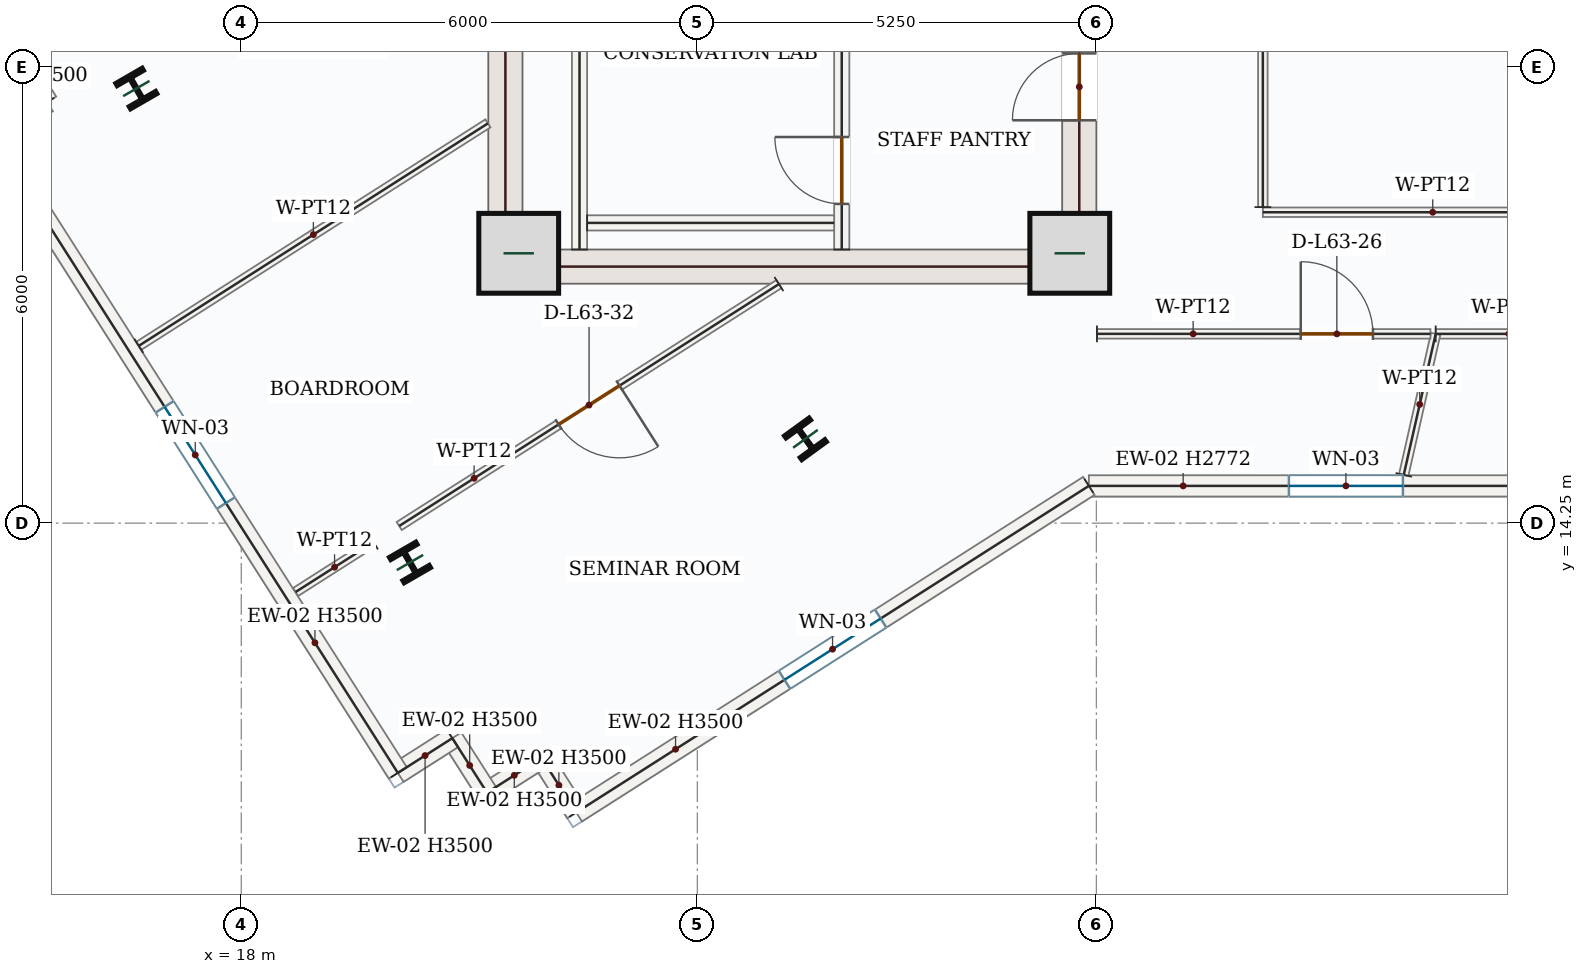
"""IFC4 building model, lengths in metres.
Left out: names, types, materials, properties, quantities, classifications, styles, units other than length and angle.
Written with IfcOpenShell. Run it as: python <this file> out.ifc"""

import sys

from ifc_helpers import new_model, si_unit, direction, frame, frame_2d, origin, origin_2d, place, context, subcontext, project, spatial, rectangle, i_section, extrude, source, transform, mapped, element, fill, save


model = new_model("IFC4")
c1 = context("Model", 3, precision=1e-05, world=origin(), true_north=direction((0.0, 1.0)))
c2 = subcontext(c1, "Body", "Model", "MODEL_VIEW")
j1 = project(units=[si_unit("LENGTHUNIT", "METRE"), si_unit("PLANEANGLEUNIT", "RADIAN")], contexts=[c1])
p1 = place(None, origin())
s1 = spatial("IfcSite", under=j1, at=p1, CompositionType="ELEMENT")
p2 = place(p1, origin())
s2 = spatial("IfcBuilding", under=s1, at=p2, CompositionType="ELEMENT")
p3 = place(p2, frame((0.0, 0.0, 265.35)))
s3 = spatial("IfcBuildingStorey", under=s2, at=p3, CompositionType="ELEMENT", Elevation=265.35)
m1 = source(origin(), c2, "Body", "SweptSolid", [
    extrude(rectangle(XDim=8.55, YDim=0.45, at=frame_2d((4.275, 0.0))), origin(), (0.0, 0.0, 1.0), 3.5),
])
p4 = place(p3, frame((21.475, 17.4, 0.0), z_axis=(0.0, 0.0, 1.0), x_axis=(0.0, 1.0, 0.0)))
e1 = element("IfcWall", 1, at=p4, inside=s3, PredefinedType="SHEAR", context=c2, shape_type="MappedRepresentation", body=[
    mapped(m1, transform((0.0, 0.0, 0.0), x_axis=(1.0, 0.0, 0.0), y_axis=(0.0, 1.0, 0.0), z_axis=(0.0, 0.0, 1.0), scale=1.0)),
])
p5 = place(p3, frame((29.025, 17.4, 0.0), z_axis=(0.0, 0.0, 1.0), x_axis=(0.0, 1.0, 0.0)))
e2 = element("IfcWall", 2, at=p5, inside=s3, PredefinedType="SHEAR", context=c2, shape_type="SweptSolid", body=[
    extrude(rectangle(XDim=8.55, YDim=0.45, at=frame_2d((4.275, 0.0))), origin(), (0.0, 0.0, 1.0), 3.5),
])
p6 = place(p5, frame((6.65, 0.0, 0.0)))
e3 = element("IfcOpeningElement", 3, at=p6, cuts=e2, PredefinedType="OPENING", context=c2, shape_type="SweptSolid", body=[
    extrude(rectangle(XDim=1.1, YDim=2.2, at=frame_2d((0.55, 1.1))), frame((0.0, 0.235, 0.0), z_axis=(0.0, -1.0, 0.0), x_axis=(1.0, 0.0, 0.0)), (0.0, 0.0, 1.0), 0.47),
])
p7 = place(p5, frame((2.15, 0.0, 0.0)))
e4 = element("IfcOpeningElement", 4, at=p7, cuts=e2, PredefinedType="OPENING", context=c2, shape_type="SweptSolid", body=[
    extrude(rectangle(XDim=0.88, YDim=2.1, at=frame_2d((0.44, 1.05))), frame((0.0, 0.235, 0.0), z_axis=(0.0, -1.0, 0.0), x_axis=(1.0, 0.0, 0.0)), (0.0, 0.0, 1.0), 0.47),
])
p8 = place(p5, frame((4.25, 0.0, 0.0)))
e5 = element("IfcOpeningElement", 5, at=p8, cuts=e2, PredefinedType="OPENING", context=c2, shape_type="SweptSolid", body=[
    extrude(rectangle(XDim=0.88, YDim=2.1, at=frame_2d((0.44, 1.05))), frame((0.0, 0.235, 0.0), z_axis=(0.0, -1.0, 0.0), x_axis=(1.0, 0.0, 0.0)), (0.0, 0.0, 1.0), 0.47),
])
m2 = source(origin(), c2, "Body", "SweptSolid", [
    extrude(rectangle(XDim=7.1, YDim=0.45, at=frame_2d((3.55, 0.0))), origin(), (0.0, 0.0, 1.0), 3.5),
])
p9 = place(p3, frame((21.7, 17.625, 0.0), z_axis=(0.0, 0.0, 1.0), x_axis=(1.0, 0.0, 0.0)))
e6 = element("IfcWall", 6, at=p9, inside=s3, PredefinedType="SHEAR", context=c2, shape_type="MappedRepresentation", body=[
    mapped(m2, transform((0.0, 0.0, 0.0), x_axis=(1.0, 0.0, 0.0), y_axis=(0.0, 1.0, 0.0), z_axis=(0.0, 0.0, 1.0), scale=1.0)),
])
m3 = source(origin(), c2, "Body", "SweptSolid", [
    extrude(rectangle(XDim=1.05, YDim=1.05, at=origin_2d()), origin(), (0.0, 0.0, 1.0), 3.75),
])
for number, where, z_axis, x_axis in (
    (7, (21.65, 17.8, 0.0), (0.0, 0.0, 1.0), (1.0, 0.0, 0.0)),
    (8, (28.9, 17.8, 0.0), (0.0, 0.0, 1.0), (1.0, 0.0, 0.0)),
):
    element("IfcColumn", number, at=place(p3, frame(where, z_axis=z_axis, x_axis=x_axis)), inside=s3, PredefinedType="COLUMN", context=c2, shape_type="MappedRepresentation", body=[
        mapped(m3, transform((0.0, 0.0, 0.0), x_axis=(1.0, 0.0, 0.0), y_axis=(0.0, 1.0, 0.0), z_axis=(0.0, 0.0, 1.0), scale=1.0)),
    ])
m4 = source(origin(), c2, "Body", "SweptSolid", [
    extrude(i_section(OverallWidth=0.399, OverallDepth=0.386, WebThickness=0.021, FlangeThickness=0.033, FilletRadius=0.018, at=origin_2d()), origin(), (0.0, 0.0, 1.0), 3.75),
])
for number, where, z_axis, x_axis in (
    (9, (25.422, 15.359, 0.0), (0.0, 0.0, 1.0), (0.809, 0.588, 0.0)),
    (10, (16.62, 19.968, 0.0), (0.0, 0.0, 1.0), (0.866, 0.5, 0.0)),
    (11, (20.22, 13.732, 0.0), (0.0, 0.0, 1.0), (0.866, 0.5, 0.0)),
):
    element("IfcColumn", number, at=place(p3, frame(where, z_axis=z_axis, x_axis=x_axis)), inside=s3, PredefinedType="COLUMN", context=c2, shape_type="MappedRepresentation", body=[
        mapped(m4, transform((0.0, 0.0, 0.0), x_axis=(1.0, 0.0, 0.0), y_axis=(0.0, 1.0, 0.0), z_axis=(0.0, 0.0, 1.0), scale=1.0)),
    ])
p10 = place(p3, frame((35.914, 14.74, 0.0), z_axis=(0.0, 0.0, 1.0), x_axis=(-1.0, 0.0, 0.0)))
e12 = element("IfcWall", 12, at=p10, inside=s3, PredefinedType="SOLIDWALL", context=c2, shape_type="SweptSolid", body=[
    extrude(rectangle(XDim=6.763, YDim=0.28, at=frame_2d((3.381, 0.0))), origin(), (0.0, 0.0, 1.0), 2.772),
])
p11 = place(p10, frame((2.631, 0.0, 0.85)))
e13 = element("IfcOpeningElement", 13, at=p11, cuts=e12, PredefinedType="OPENING", context=c2, shape_type="SweptSolid", body=[
    extrude(rectangle(XDim=1.5, YDim=1.5, at=frame_2d((0.75, 0.75))), frame((0.0, 0.15, 0.0), z_axis=(0.0, -1.0, 0.0), x_axis=(1.0, 0.0, 0.0)), (0.0, 0.0, 1.0), 0.3),
])
p12 = place(p3, frame((29.151, 14.74, 0.0), z_axis=(0.0, 0.0, 1.0), x_axis=(-0.843388565396, -0.537304129669, 0.0)))
e14 = element("IfcWall", 14, at=p12, inside=s3, PredefinedType="SOLIDWALL", context=c2, shape_type="SweptSolid", body=[
    extrude(rectangle(XDim=7.996, YDim=0.28, at=frame_2d((3.998, 0.0))), origin(), (0.0, 0.0, 1.0), 3.5),
])
p13 = place(p12, frame((3.248, 0.0, 0.85)))
e15 = element("IfcOpeningElement", 15, at=p13, cuts=e14, PredefinedType="OPENING", context=c2, shape_type="SweptSolid", body=[
    extrude(rectangle(XDim=1.5, YDim=1.5, at=frame_2d((0.75, 0.75))), frame((0.0, 0.15, 0.0), z_axis=(0.0, -1.0, 0.0), x_axis=(1.0, 0.0, 0.0)), (0.0, 0.0, 1.0), 0.3),
])
m5 = source(origin(), c2, "Body", "SweptSolid", [
    extrude(rectangle(XDim=0.85, YDim=0.28, at=frame_2d((0.425, 0.0))), origin(), (0.0, 0.0, 1.0), 3.5),
])
for number, where, z_axis, x_axis in (
    (16, (22.407, 10.444, 0.0), (0.0, 0.0, 1.0), (-0.537, 0.843, 0.0)),
    (17, (21.95, 11.16, 0.0), (0.0, 0.0, 1.0), (-0.843, -0.537, 0.0)),
    (18, (21.233, 10.704, 0.0), (0.0, 0.0, 1.0), (-0.537, 0.843, 0.0)),
    (19, (20.777, 11.421, 0.0), (0.0, 0.0, 1.0), (-0.843, -0.537, 0.0)),
):
    element("IfcWall", number, at=place(p3, frame(where, z_axis=z_axis, x_axis=x_axis)), inside=s3, PredefinedType="SOLIDWALL", context=c2, shape_type="MappedRepresentation", body=[
        mapped(m5, transform((0.0, 0.0, 0.0), x_axis=(1.0, 0.0, 0.0), y_axis=(0.0, 1.0, 0.0), z_axis=(0.0, 0.0, 1.0), scale=1.0)),
    ])
p14 = place(p3, frame((20.06, 10.964, 0.0), z_axis=(0.0, 0.0, 1.0), x_axis=(-0.537314949054, 0.843381672508, 0.0)))
e20 = element("IfcWall", 20, at=p14, inside=s3, PredefinedType="SOLIDWALL", context=c2, shape_type="SweptSolid", body=[
    extrude(rectangle(XDim=9.92, YDim=0.28, at=frame_2d((4.96, 0.0))), origin(), (0.0, 0.0, 1.0), 3.5),
])
p15 = place(p14, frame((4.21, 0.0, 0.85)))
e21 = element("IfcOpeningElement", 21, at=p15, cuts=e20, PredefinedType="OPENING", context=c2, shape_type="SweptSolid", body=[
    extrude(rectangle(XDim=1.5, YDim=1.5, at=frame_2d((0.75, 0.75))), frame((0.0, 0.15, 0.0), z_axis=(0.0, -1.0, 0.0), x_axis=(1.0, 0.0, 0.0)), (0.0, 0.0, 1.0), 0.3),
])
m6 = source(origin(), c2, "Body", "SweptSolid", [
    extrude(rectangle(XDim=0.85, YDim=0.28, at=frame_2d((0.425, 0.0))), origin(), (0.0, 0.0, 1.0), 3.5),
])
p16 = place(p3, frame((14.73, 19.33, 0.0), z_axis=(0.0, 0.0, 1.0), x_axis=(0.843401251716, 0.537284215853, 0.0)))
e22 = element("IfcWall", 22, at=p16, inside=s3, PredefinedType="SOLIDWALL", context=c2, shape_type="MappedRepresentation", body=[
    mapped(m6, transform((0.0, 0.0, 0.0), x_axis=(1.0, 0.0, 0.0), y_axis=(0.0, 1.0, 0.0), z_axis=(0.0, 0.0, 1.0), scale=1.0)),
])
for number, where, z_axis, x_axis in (
    (23, (15.447, 19.787, 0.0), (0.0, 0.0, 1.0), (-0.537, 0.843, 0.0)),
    (24, (14.99, 20.504, 0.0), (0.0, 0.0, 1.0), (0.843, 0.537, 0.0)),
):
    element("IfcWall", number, at=place(p3, frame(where, z_axis=z_axis, x_axis=x_axis)), inside=s3, PredefinedType="SOLIDWALL", context=c2, shape_type="MappedRepresentation", body=[
        mapped(m5, transform((0.0, 0.0, 0.0), x_axis=(1.0, 0.0, 0.0), y_axis=(0.0, 1.0, 0.0), z_axis=(0.0, 0.0, 1.0), scale=1.0)),
    ])
m7 = source(origin(), c2, "Body", "SweptSolid", [
    extrude(rectangle(XDim=7.87, YDim=0.2, at=frame_2d((3.935, 0.0))), origin(), (0.0, 0.0, 1.0), 3.5),
])
p17 = place(p3, frame((22.45, 17.85, 0.0), z_axis=(0.0, 0.0, 1.0), x_axis=(0.0, 1.0, 0.0)))
e25 = element("IfcWall", 25, at=p17, inside=s3, PredefinedType="SOLIDWALL", context=c2, shape_type="MappedRepresentation", body=[
    mapped(m7, transform((0.0, 0.0, 0.0), x_axis=(1.0, 0.0, 0.0), y_axis=(0.0, 1.0, 0.0), z_axis=(0.0, 0.0, 1.0), scale=1.0)),
])
p18 = place(p3, frame((25.9, 17.85, 0.0), z_axis=(0.0, 0.0, 1.0), x_axis=(0.0, 1.0, 0.0)))
e26 = element("IfcWall", 26, at=p18, inside=s3, PredefinedType="SOLIDWALL", context=c2, shape_type="SweptSolid", body=[
    extrude(rectangle(XDim=8.0, YDim=0.2, at=frame_2d((4.0, 0.0))), origin(), (0.0, 0.0, 1.0), 3.5),
])
p19 = place(p18, frame((6.2, 0.0, 0.0)))
e27 = element("IfcOpeningElement", 27, at=p19, cuts=e26, PredefinedType="OPENING", context=c2, shape_type="SweptSolid", body=[
    extrude(rectangle(XDim=1.0, YDim=2.15, at=frame_2d((0.5, 1.075))), frame((0.0, 0.11, 0.0), z_axis=(0.0, -1.0, 0.0), x_axis=(1.0, 0.0, 0.0)), (0.0, 0.0, 1.0), 0.22),
])
p20 = place(p18, frame((0.6, 0.0, 0.0)))
e28 = element("IfcOpeningElement", 28, at=p20, cuts=e26, PredefinedType="OPENING", context=c2, shape_type="SweptSolid", body=[
    extrude(rectangle(XDim=0.88, YDim=2.1, at=frame_2d((0.44, 1.05))), frame((0.0, 0.11, 0.0), z_axis=(0.0, -1.0, 0.0), x_axis=(1.0, 0.0, 0.0)), (0.0, 0.0, 1.0), 0.22),
])
m8 = source(origin(), c2, "Body", "SweptSolid", [
    extrude(rectangle(XDim=3.25, YDim=0.2, at=frame_2d((1.625, 0.0))), origin(), (0.0, 0.0, 1.0), 3.5),
])
p21 = place(p3, frame((22.55, 18.2, 0.0), z_axis=(0.0, 0.0, 1.0), x_axis=(1.0, 0.0, 0.0)))
e29 = element("IfcWall", 29, at=p21, inside=s3, PredefinedType="SOLIDWALL", context=c2, shape_type="MappedRepresentation", body=[
    mapped(m8, transform((0.0, 0.0, 0.0), x_axis=(1.0, 0.0, 0.0), y_axis=(0.0, 1.0, 0.0), z_axis=(0.0, 0.0, 1.0), scale=1.0)),
])
p22 = place(p3, frame((25.073, 17.395, 0.0), z_axis=(0.0, 0.0, 1.0), x_axis=(-0.843398332862, -0.537288797693, 0.0)))
e30 = element("IfcWall", 30, at=p22, inside=s3, PredefinedType="PARTITIONING", context=c2, shape_type="SweptSolid", body=[
    extrude(rectangle(XDim=5.924, YDim=0.125, at=frame_2d((2.962, 0.0))), origin(), (0.0, 0.0, 1.0), 3.5),
])
p23 = place(p22, frame((2.487, 0.0, 0.0)))
e31 = element("IfcOpeningElement", 31, at=p23, cuts=e30, PredefinedType="OPENING", context=c2, shape_type="SweptSolid", body=[
    extrude(rectangle(XDim=0.95, YDim=2.15, at=frame_2d((0.475, 1.075))), frame((0.0, 0.073, 0.0), z_axis=(0.0, -1.0, 0.0), x_axis=(1.0, 0.0, 0.0)), (0.0, 0.0, 1.0), 0.145),
])
m9 = source(origin(), c2, "Body", "SweptSolid", [
    extrude(rectangle(XDim=1.215, YDim=0.125, at=frame_2d((0.607, 0.0))), origin(), (0.0, 0.0, 1.0), 3.5),
])
p24 = place(p3, frame((19.74, 13.997, 0.0), z_axis=(0.0, 0.0, 1.0), x_axis=(-0.84340481812, -0.537278617453, 0.0)))
e32 = element("IfcWall", 32, at=p24, inside=s3, PredefinedType="PARTITIONING", context=c2, shape_type="MappedRepresentation", body=[
    mapped(m9, transform((0.0, 0.0, 0.0), x_axis=(1.0, 0.0, 0.0), y_axis=(0.0, 1.0, 0.0), z_axis=(0.0, 0.0, 1.0), scale=1.0)),
])
m10 = source(origin(), c2, "Body", "SweptSolid", [
    extrude(rectangle(XDim=5.446, YDim=0.125, at=frame_2d((2.723, 0.0))), origin(), (0.0, 0.0, 1.0), 3.5),
])
p25 = place(p3, frame((16.652, 16.583, 0.0), z_axis=(0.0, 0.0, 1.0), x_axis=(0.843395566027, 0.537293140851, 0.0)))
e33 = element("IfcWall", 33, at=p25, inside=s3, PredefinedType="PARTITIONING", context=c2, shape_type="MappedRepresentation", body=[
    mapped(m10, transform((0.0, 0.0, 0.0), x_axis=(1.0, 0.0, 0.0), y_axis=(0.0, 1.0, 0.0), z_axis=(0.0, 0.0, 1.0), scale=1.0)),
])
m11 = source(origin(), c2, "Body", "SweptSolid", [
    extrude(rectangle(XDim=4.47, YDim=0.125, at=frame_2d((2.235, 0.0))), origin(), (0.0, 0.0, 1.0), 3.5),
])
p26 = place(p3, frame((35.91, 18.34, 0.0), z_axis=(0.0, 0.0, 1.0), x_axis=(-1.0, 0.0, 0.0)))
e34 = element("IfcWall", 34, at=p26, inside=s3, PredefinedType="PARTITIONING", context=c2, shape_type="MappedRepresentation", body=[
    mapped(m11, transform((0.0, 0.0, 0.0), x_axis=(1.0, 0.0, 0.0), y_axis=(0.0, 1.0, 0.0), z_axis=(0.0, 0.0, 1.0), scale=1.0)),
])
m12 = source(origin(), c2, "Body", "SweptSolid", [
    extrude(rectangle(XDim=7.403, YDim=0.125, at=frame_2d((3.701, 0.0))), origin(), (0.0, 0.0, 1.0), 3.5),
])
p27 = place(p3, frame((31.44, 18.407, 0.0), z_axis=(0.0, 0.0, 1.0), x_axis=(0.0, 1.0, 0.0)))
e35 = element("IfcWall", 35, at=p27, inside=s3, PredefinedType="PARTITIONING", context=c2, shape_type="MappedRepresentation", body=[
    mapped(m12, transform((0.0, 0.0, 0.0), x_axis=(1.0, 0.0, 0.0), y_axis=(0.0, 1.0, 0.0), z_axis=(0.0, 0.0, 1.0), scale=1.0)),
])
p28 = place(p3, frame((33.714, 16.74, 0.0), z_axis=(0.0, 0.0, 1.0), x_axis=(1.0, 0.0, 0.0)))
e36 = element("IfcWall", 36, at=p28, inside=s3, PredefinedType="PARTITIONING", context=c2, shape_type="SweptSolid", body=[
    extrude(rectangle(XDim=5.099, YDim=0.125, at=frame_2d((2.55, 0.0))), origin(), (0.0, 0.0, 1.0), 3.5),
])
p29 = place(p28, frame((2.075, 0.0, 0.0)))
e37 = element("IfcOpeningElement", 37, at=p29, cuts=e36, PredefinedType="OPENING", context=c2, shape_type="SweptSolid", body=[
    extrude(rectangle(XDim=0.95, YDim=2.15, at=frame_2d((0.475, 1.075))), frame((0.0, 0.073, 0.0), z_axis=(0.0, -1.0, 0.0), x_axis=(1.0, 0.0, 0.0)), (0.0, 0.0, 1.0), 0.145),
])
m13 = source(origin(), c2, "Body", "SweptSolid", [
    extrude(rectangle(XDim=1.902, YDim=0.125, at=frame_2d((0.951, 0.0))), origin(), (0.0, 0.0, 1.0), 3.5),
])
p30 = place(p3, frame((33.294, 14.885, 0.0), z_axis=(0.0, 0.0, 1.0), x_axis=(0.221032985594, 0.975266332485, 0.0)))
e38 = element("IfcWall", 38, at=p30, inside=s3, PredefinedType="PARTITIONING", context=c2, shape_type="MappedRepresentation", body=[
    mapped(m13, transform((0.0, 0.0, 0.0), x_axis=(1.0, 0.0, 0.0), y_axis=(0.0, 1.0, 0.0), z_axis=(0.0, 0.0, 1.0), scale=1.0)),
])
p31 = place(p3, frame((29.258, 16.74, 0.0), z_axis=(0.0, 0.0, 1.0), x_axis=(0.999999998452, -5.5645206e-05, 0.0)))
e39 = element("IfcWall", 39, at=p31, inside=s3, PredefinedType="PARTITIONING", context=c2, shape_type="SweptSolid", body=[
    extrude(rectangle(XDim=4.387, YDim=0.125, at=frame_2d((2.194, 0.0))), origin(), (0.0, 0.0, 1.0), 3.5),
])
p32 = place(p31, frame((2.681, 0.0, 0.0)))
e40 = element("IfcOpeningElement", 40, at=p32, cuts=e39, PredefinedType="OPENING", context=c2, shape_type="SweptSolid", body=[
    extrude(rectangle(XDim=0.95, YDim=2.15, at=frame_2d((0.475, 1.075))), frame((0.0, 0.073, 0.0), z_axis=(0.0, -1.0, 0.0), x_axis=(1.0, 0.0, 0.0)), (0.0, 0.0, 1.0), 0.145),
])
m14 = source(origin(), c2, "Body", "SweptSolid", [
    extrude(rectangle(XDim=1.5, YDim=1.5, at=frame_2d((0.75, 0.75))), frame((0.0, 0.03, 0.0), z_axis=(0.0, -1.0, 0.0), x_axis=(1.0, 0.0, 0.0)), (0.0, 0.0, 1.0), 0.06),
])
p33 = place(p11, origin())
e41 = element("IfcWindow", 41, at=p33, inside=s3, PartitioningType="SINGLE_PANEL", PredefinedType="WINDOW", context=c2, shape_type="MappedRepresentation", body=[
    mapped(m14, transform((0.0, 0.0, 0.0), x_axis=(1.0, 0.0, 0.0), y_axis=(0.0, 1.0, 0.0), z_axis=(0.0, 0.0, 1.0), scale=1.0)),
])
fill(e13, e41)
p34 = place(p13, origin())
e42 = element("IfcWindow", 42, at=p34, inside=s3, PartitioningType="SINGLE_PANEL", PredefinedType="WINDOW", context=c2, shape_type="MappedRepresentation", body=[
    mapped(m14, transform((0.0, 0.0, 0.0), x_axis=(1.0, 0.0, 0.0), y_axis=(0.0, 1.0, 0.0), z_axis=(0.0, 0.0, 1.0), scale=1.0)),
])
fill(e15, e42)
p35 = place(p15, origin())
e43 = element("IfcWindow", 43, at=p35, inside=s3, PartitioningType="SINGLE_PANEL", PredefinedType="WINDOW", context=c2, shape_type="MappedRepresentation", body=[
    mapped(m14, transform((0.0, 0.0, 0.0), x_axis=(1.0, 0.0, 0.0), y_axis=(0.0, 1.0, 0.0), z_axis=(0.0, 0.0, 1.0), scale=1.0)),
])
fill(e21, e43)
m15 = source(origin(), c2, "Body", "SweptSolid", [
    extrude(rectangle(XDim=0.88, YDim=2.1, at=frame_2d((0.44, 1.05))), frame((0.0, 0.025, 0.0), z_axis=(0.0, -1.0, 0.0), x_axis=(1.0, 0.0, 0.0)), (0.0, 0.0, 1.0), 0.05),
])
p36 = place(p20, origin())
e44 = element("IfcDoor", 44, at=p36, inside=s3, OperationType="SINGLE_SWING_RIGHT", PredefinedType="DOOR", context=c2, shape_type="MappedRepresentation", body=[
    mapped(m15, transform((0.0, 0.0, 0.0), x_axis=(1.0, 0.0, 0.0), y_axis=(0.0, 1.0, 0.0), z_axis=(0.0, 0.0, 1.0), scale=1.0)),
])
fill(e28, e44)
p37 = place(p7, origin())
e45 = element("IfcDoor", 45, at=p37, inside=s3, OperationType="SINGLE_SWING_LEFT", PredefinedType="DOOR", context=c2, shape_type="MappedRepresentation", body=[
    mapped(m15, transform((0.0, 0.0, 0.0), x_axis=(1.0, 0.0, 0.0), y_axis=(0.0, 1.0, 0.0), z_axis=(0.0, 0.0, 1.0), scale=1.0)),
])
fill(e4, e45)
m16 = source(origin(), c2, "Body", "SweptSolid", [
    extrude(rectangle(XDim=0.95, YDim=2.15, at=frame_2d((0.475, 1.075))), frame((0.0, 0.025, 0.0), z_axis=(0.0, -1.0, 0.0), x_axis=(1.0, 0.0, 0.0)), (0.0, 0.0, 1.0), 0.05),
])
p38 = place(p32, origin())
e46 = element("IfcDoor", 46, at=p38, inside=s3, OperationType="SINGLE_SWING_LEFT", PredefinedType="DOOR", context=c2, shape_type="MappedRepresentation", body=[
    mapped(m16, transform((0.0, 0.0, 0.0), x_axis=(1.0, 0.0, 0.0), y_axis=(0.0, 1.0, 0.0), z_axis=(0.0, 0.0, 1.0), scale=1.0)),
])
fill(e40, e46)
p39 = place(p23, origin())
e47 = element("IfcDoor", 47, at=p39, inside=s3, OperationType="SINGLE_SWING_LEFT", PredefinedType="DOOR", context=c2, shape_type="MappedRepresentation", body=[
    mapped(m16, transform((0.0, 0.0, 0.0), x_axis=(1.0, 0.0, 0.0), y_axis=(0.0, 1.0, 0.0), z_axis=(0.0, 0.0, 1.0), scale=1.0)),
])
fill(e31, e47)
save(model, sys.argv[1])
